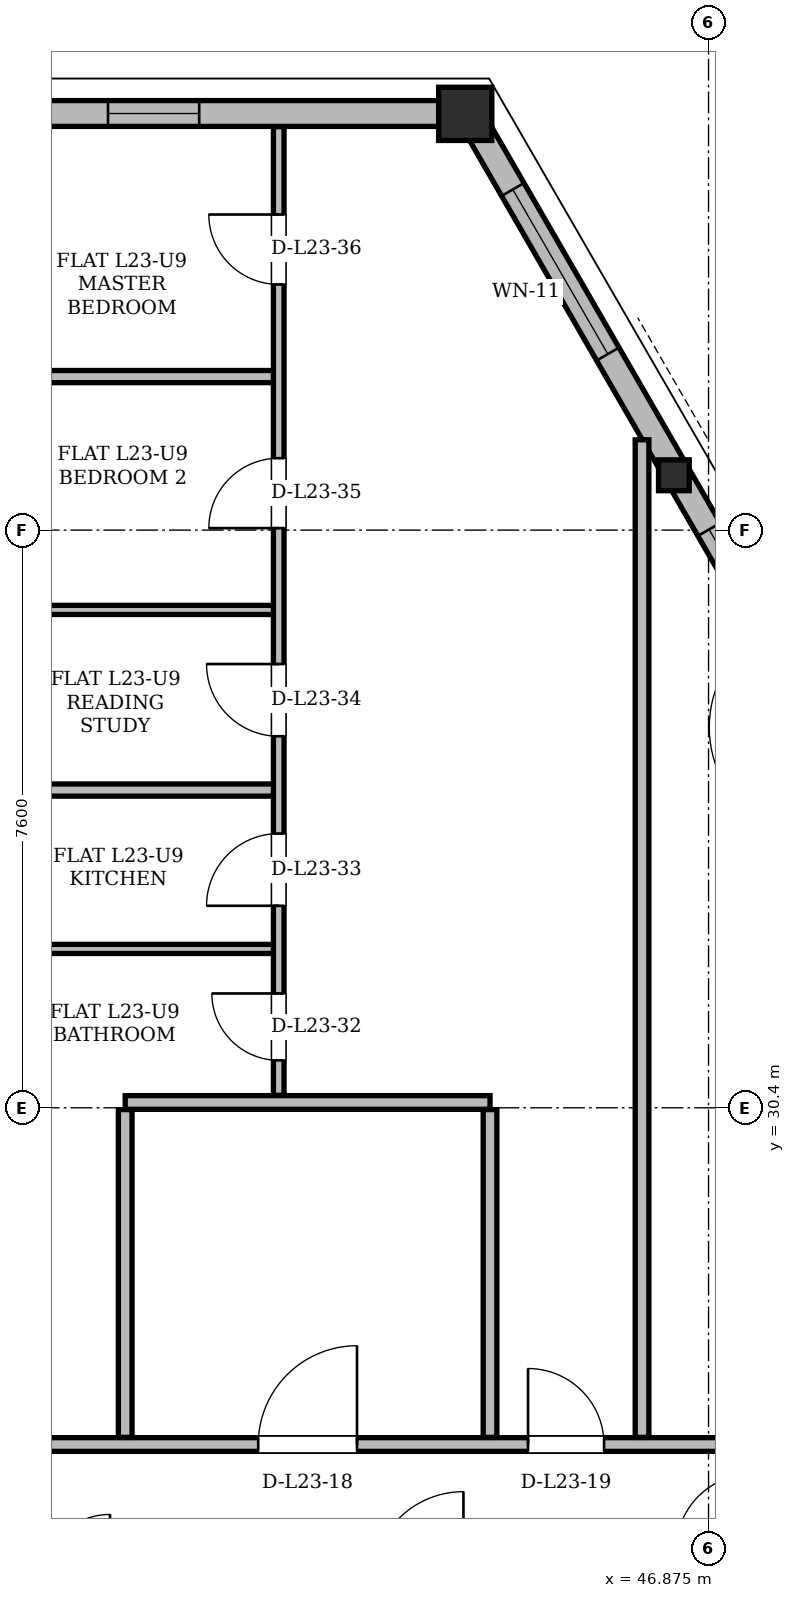
"""IFC4 building model, lengths in metres.
Left out: names, types, materials, properties, quantities, classifications, styles, units other than length and angle.
Written with IfcOpenShell. Run it as: python <this file> out.ifc"""

import sys

from ifc_helpers import new_model, si_unit, direction, frame, frame_2d, origin, origin_2d, place, context, subcontext, project, spatial, rectangle, hollow_rectangle, i_section, extrude, element, fill, save


model = new_model("IFC4")
c1 = context("Model", 3, precision=1e-05, world=origin(), true_north=direction((0.0, 1.0)))
c2 = subcontext(c1, "Body", "Model", "MODEL_VIEW")
j1 = project(units=[si_unit("LENGTHUNIT", "METRE"), si_unit("PLANEANGLEUNIT", "RADIAN")], contexts=[c1])
p1 = place(None, origin())
s1 = spatial("IfcSite", under=j1, at=p1, CompositionType="ELEMENT")
p2 = place(p1, origin())
s2 = spatial("IfcBuilding", under=s1, at=p2, CompositionType="ELEMENT")
p3 = place(p2, frame((0.0, 0.0, 89.7)))
s3 = spatial("IfcBuildingStorey", under=s2, at=p3, CompositionType="ELEMENT", Elevation=89.7)
p4 = place(p3, frame((43.722, 43.481, 0.005), z_axis=(-0.027185941193, -0.002582664413, 0.99962705768), x_axis=(0.094574192526, -0.995517816068, 0.0)))
e1 = element("IfcColumn", 1, at=p4, inside=s3, PredefinedType="COLUMN", context=c2, shape_type="SweptSolid", body=[
    extrude(hollow_rectangle(XDim=0.7, YDim=0.7, WallThickness=0.055, at=origin_2d()), origin(), (0.0, 0.0, 1.0), 3.592),
])
p5 = place(p3, frame((46.465, 38.732, 0.005), z_axis=(-0.025419707024, -0.005709239011, 0.999660563934), x_axis=(0.219139714241, -0.975693489597, 0.0)))
e2 = element("IfcColumn", 2, at=p5, inside=s3, PredefinedType="COLUMN", context=c2, shape_type="SweptSolid", body=[
    extrude(i_section(OverallWidth=0.404, OverallDepth=0.406, WebThickness=0.027, FlangeThickness=0.044, at=origin_2d()), origin(), (0.0, 0.0, 1.0), 3.592),
])
p6 = place(p3, frame((60.86, 13.798, 0.0), z_axis=(0.0, 0.0, 1.0), x_axis=(-0.500004029544, 0.866023077313, 0.0)))
e3 = element("IfcWall", 3, at=p6, inside=s3, PredefinedType="SOLIDWALL", context=c2, shape_type="SweptSolid", body=[
    extrude(rectangle(XDim=34.275, YDim=0.34, at=frame_2d((17.137, 0.0))), origin(), (0.0, 0.0, 1.0), 2.578),
])
p7 = place(p6, frame((6.579, 0.0, 0.0)))
e4 = element("IfcOpeningElement", 4, at=p7, cuts=e3, PredefinedType="OPENING", context=c2, shape_type="SweptSolid", body=[
    extrude(rectangle(XDim=1.5, YDim=2.2, at=frame_2d((0.75, 1.1))), frame((0.0, 0.17, 0.0), z_axis=(0.0, -1.0, 0.0), x_axis=(1.0, 0.0, 0.0)), (0.0, 0.0, 1.0), 0.34),
])
p8 = place(p6, frame((24.95, 0.0, 0.0)))
e5 = element("IfcOpeningElement", 5, at=p8, cuts=e3, PredefinedType="OPENING", context=c2, shape_type="SweptSolid", body=[
    extrude(rectangle(XDim=1.5, YDim=2.2, at=frame_2d((0.75, 1.1))), frame((0.0, 0.17, 0.0), z_axis=(0.0, -1.0, 0.0), x_axis=(1.0, 0.0, 0.0)), (0.0, 0.0, 1.0), 0.34),
])
p9 = place(p6, frame((1.607, 0.0, 0.85)))
e6 = element("IfcOpeningElement", 6, at=p9, cuts=e3, PredefinedType="OPENING", context=c2, shape_type="SweptSolid", body=[
    extrude(rectangle(XDim=1.2, YDim=1.48, at=frame_2d((0.6, 0.74))), frame((0.0, 0.17, 0.0), z_axis=(0.0, -1.0, 0.0), x_axis=(1.0, 0.0, 0.0)), (0.0, 0.0, 1.0), 0.34),
])
p10 = place(p6, frame((30.62, 0.0, 0.85)))
e7 = element("IfcOpeningElement", 7, at=p10, cuts=e3, PredefinedType="OPENING", context=c2, shape_type="SweptSolid", body=[
    extrude(rectangle(XDim=2.5, YDim=1.618, at=frame_2d((1.25, 0.809))), frame((0.0, 0.17, 0.0), z_axis=(0.0, -1.0, 0.0), x_axis=(1.0, 0.0, 0.0)), (0.0, 0.0, 1.0), 0.34),
])
p11 = place(p6, frame((20.128, 0.0, 0.85)))
e8 = element("IfcOpeningElement", 8, at=p11, cuts=e3, PredefinedType="OPENING", context=c2, shape_type="SweptSolid", body=[
    extrude(rectangle(XDim=2.4, YDim=1.618, at=frame_2d((1.2, 0.809))), frame((0.0, 0.17, 0.0), z_axis=(0.0, -1.0, 0.0), x_axis=(1.0, 0.0, 0.0)), (0.0, 0.0, 1.0), 0.34),
])
p12 = place(p6, frame((26.756, 0.0, 0.85)))
e9 = element("IfcOpeningElement", 9, at=p12, cuts=e3, PredefinedType="OPENING", context=c2, shape_type="SweptSolid", body=[
    extrude(rectangle(XDim=1.2, YDim=1.48, at=frame_2d((0.6, 0.74))), frame((0.0, 0.17, 0.0), z_axis=(0.0, -1.0, 0.0), x_axis=(1.0, 0.0, 0.0)), (0.0, 0.0, 1.0), 0.34),
])
p13 = place(p6, frame((15.335, 0.0, 0.85)))
e10 = element("IfcOpeningElement", 10, at=p13, cuts=e3, PredefinedType="OPENING", context=c2, shape_type="SweptSolid", body=[
    extrude(rectangle(XDim=1.2, YDim=1.48, at=frame_2d((0.6, 0.74))), frame((0.0, 0.17, 0.0), z_axis=(0.0, -1.0, 0.0), x_axis=(1.0, 0.0, 0.0)), (0.0, 0.0, 1.0), 0.34),
])
p14 = place(p6, frame((17.911, 0.0, 0.85)))
e11 = element("IfcOpeningElement", 11, at=p14, cuts=e3, PredefinedType="OPENING", context=c2, shape_type="SweptSolid", body=[
    extrude(rectangle(XDim=1.2, YDim=1.48, at=frame_2d((0.6, 0.74))), frame((0.0, 0.17, 0.0), z_axis=(0.0, -1.0, 0.0), x_axis=(1.0, 0.0, 0.0)), (0.0, 0.0, 1.0), 0.34),
])
p15 = place(p3, frame((43.722, 43.481, 0.0), z_axis=(0.0, 0.0, 1.0), x_axis=(-1.0, 0.0, 0.0)))
e12 = element("IfcWall", 12, at=p15, inside=s3, PredefinedType="SOLIDWALL", context=c2, shape_type="SweptSolid", body=[
    extrude(rectangle(XDim=12.445, YDim=0.34, at=frame_2d((6.222, 0.0))), origin(), (0.0, 0.0, 1.0), 2.578),
])
p16 = place(p15, frame((3.549, 0.0, 0.85)))
e13 = element("IfcOpeningElement", 13, at=p16, cuts=e12, PredefinedType="OPENING", context=c2, shape_type="SweptSolid", body=[
    extrude(rectangle(XDim=1.2, YDim=1.48, at=frame_2d((0.6, 0.74))), frame((0.0, 0.17, 0.0), z_axis=(0.0, -1.0, 0.0), x_axis=(1.0, 0.0, 0.0)), (0.0, 0.0, 1.0), 0.34),
])
p17 = place(p3, frame((27.55, 25.97, 0.0), z_axis=(0.0, 0.0, 1.0), x_axis=(1.0, 0.0, 0.0)))
e14 = element("IfcWall", 14, at=p17, inside=s3, PredefinedType="PARTITIONING", context=c2, shape_type="SweptSolid", body=[
    extrude(rectangle(XDim=19.9, YDim=0.18, at=frame_2d((9.95, 0.0))), origin(), (0.0, 0.0, 1.0), 2.814),
])
p18 = place(p17, frame((0.425, 0.0, 0.0)))
e15 = element("IfcOpeningElement", 15, at=p18, cuts=e14, PredefinedType="OPENING", context=c2, shape_type="SweptSolid", body=[
    extrude(rectangle(XDim=1.0, YDim=2.18, at=frame_2d((0.5, 1.09))), frame((0.0, 0.09, 0.0), z_axis=(0.0, -1.0, 0.0), x_axis=(1.0, 0.0, 0.0)), (0.0, 0.0, 1.0), 0.18),
])
p19 = place(p17, frame((4.222, 0.0, 0.0)))
e16 = element("IfcOpeningElement", 16, at=p19, cuts=e14, PredefinedType="OPENING", context=c2, shape_type="SweptSolid", body=[
    extrude(rectangle(XDim=1.0, YDim=2.18, at=frame_2d((0.5, 1.09))), frame((0.0, 0.09, 0.0), z_axis=(0.0, -1.0, 0.0), x_axis=(1.0, 0.0, 0.0)), (0.0, 0.0, 1.0), 0.18),
])
p20 = place(p17, frame((13.4, 0.0, 0.0)))
e17 = element("IfcOpeningElement", 17, at=p20, cuts=e14, PredefinedType="OPENING", context=c2, shape_type="SweptSolid", body=[
    extrude(rectangle(XDim=1.3, YDim=2.2, at=frame_2d((0.65, 1.1))), frame((0.0, 0.09, 0.0), z_axis=(0.0, -1.0, 0.0), x_axis=(1.0, 0.0, 0.0)), (0.0, 0.0, 1.0), 0.18),
])
p21 = place(p17, frame((16.95, 0.0, 0.0)))
e18 = element("IfcOpeningElement", 18, at=p21, cuts=e14, PredefinedType="OPENING", context=c2, shape_type="SweptSolid", body=[
    extrude(rectangle(XDim=1.0, YDim=2.18, at=frame_2d((0.5, 1.09))), frame((0.0, 0.09, 0.0), z_axis=(0.0, -1.0, 0.0), x_axis=(1.0, 0.0, 0.0)), (0.0, 0.0, 1.0), 0.18),
])
p22 = place(p3, frame((39.2, 30.47, 0.0), z_axis=(0.0, 0.0, 1.0), x_axis=(1.0, 0.0, 0.0)))
e19 = element("IfcWall", 19, at=p22, inside=s3, PredefinedType="PARTITIONING", context=c2, shape_type="SweptSolid", body=[
    extrude(rectangle(XDim=4.8, YDim=0.18, at=frame_2d((2.4, 0.0))), origin(), (0.0, 0.0, 1.0), 3.36),
])
p23 = place(p3, frame((37.95, 32.49, 0.0), z_axis=(0.0, 0.0, 1.0), x_axis=(1.0, 0.0, 0.0)))
e20 = element("IfcWall", 20, at=p23, inside=s3, PredefinedType="PARTITIONING", context=c2, shape_type="SweptSolid", body=[
    extrude(rectangle(XDim=3.27, YDim=0.12, at=frame_2d((1.635, 0.0))), origin(), (0.0, 0.0, 1.0), 3.36),
])
p24 = place(p3, frame((37.95, 34.58, 0.0), z_axis=(0.0, 0.0, 1.0), x_axis=(1.0, 0.0, 0.0)))
e21 = element("IfcWall", 21, at=p24, inside=s3, PredefinedType="PARTITIONING", context=c2, shape_type="SweptSolid", body=[
    extrude(rectangle(XDim=3.27, YDim=0.16, at=frame_2d((1.635, 0.0))), origin(), (0.0, 0.0, 1.0), 3.36),
])
p25 = place(p3, frame((37.95, 36.95, 0.0), z_axis=(0.0, 0.0, 1.0), x_axis=(1.0, 0.0, 0.0)))
e22 = element("IfcWall", 22, at=p25, inside=s3, PredefinedType="PARTITIONING", context=c2, shape_type="SweptSolid", body=[
    extrude(rectangle(XDim=3.27, YDim=0.12, at=frame_2d((1.635, 0.0))), origin(), (0.0, 0.0, 1.0), 3.36),
])
p26 = place(p3, frame((37.95, 40.02, 0.0), z_axis=(0.0, 0.0, 1.0), x_axis=(1.0, 0.0, 0.0)))
e23 = element("IfcWall", 23, at=p26, inside=s3, PredefinedType="PARTITIONING", context=c2, shape_type="SweptSolid", body=[
    extrude(rectangle(XDim=3.27, YDim=0.16, at=frame_2d((1.635, 0.0))), origin(), (0.0, 0.0, 1.0), 3.36),
])
p27 = place(p3, frame((39.2, 26.064, 0.0), z_axis=(0.0, 0.0, 1.0), x_axis=(0.0, 1.0, 0.0)))
e24 = element("IfcWall", 24, at=p27, inside=s3, PredefinedType="PARTITIONING", context=c2, shape_type="SweptSolid", body=[
    extrude(rectangle(XDim=4.312, YDim=0.18, at=frame_2d((2.156, 0.0))), origin(), (0.0, 0.0, 1.0), 3.36),
])
p28 = place(p3, frame((41.22, 30.564, 0.0), z_axis=(0.0, 0.0, 1.0), x_axis=(0.0, 1.0, 0.0)))
e25 = element("IfcWall", 25, at=p28, inside=s3, PredefinedType="PARTITIONING", context=c2, shape_type="SweptSolid", body=[
    extrude(rectangle(XDim=12.743, YDim=0.14, at=frame_2d((6.372, 0.0))), origin(), (0.0, 0.0, 1.0), 3.36),
])
p29 = place(p28, frame((0.46, 0.0, 0.0)))
e26 = element("IfcOpeningElement", 26, at=p29, cuts=e25, PredefinedType="OPENING", context=c2, shape_type="SweptSolid", body=[
    extrude(rectangle(XDim=0.88, YDim=2.08, at=frame_2d((0.44, 1.04))), frame((0.0, 0.07, 0.0), z_axis=(0.0, -1.0, 0.0), x_axis=(1.0, 0.0, 0.0)), (0.0, 0.0, 1.0), 0.14),
])
p30 = place(p28, frame((2.494, 0.0, 0.0)))
e27 = element("IfcOpeningElement", 27, at=p30, cuts=e25, PredefinedType="OPENING", context=c2, shape_type="SweptSolid", body=[
    extrude(rectangle(XDim=0.95, YDim=2.1, at=frame_2d((0.475, 1.05))), frame((0.0, 0.07, 0.0), z_axis=(0.0, -1.0, 0.0), x_axis=(1.0, 0.0, 0.0)), (0.0, 0.0, 1.0), 0.14),
])
p31 = place(p28, frame((4.724, 0.0, 0.0)))
e28 = element("IfcOpeningElement", 28, at=p31, cuts=e25, PredefinedType="OPENING", context=c2, shape_type="SweptSolid", body=[
    extrude(rectangle(XDim=0.95, YDim=2.1, at=frame_2d((0.475, 1.05))), frame((0.0, 0.07, 0.0), z_axis=(0.0, -1.0, 0.0), x_axis=(1.0, 0.0, 0.0)), (0.0, 0.0, 1.0), 0.14),
])
p32 = place(p28, frame((7.462, 0.0, 0.0)))
e29 = element("IfcOpeningElement", 29, at=p32, cuts=e25, PredefinedType="OPENING", context=c2, shape_type="SweptSolid", body=[
    extrude(rectangle(XDim=0.92, YDim=2.12, at=frame_2d((0.46, 1.06))), frame((0.0, 0.07, 0.0), z_axis=(0.0, -1.0, 0.0), x_axis=(1.0, 0.0, 0.0)), (0.0, 0.0, 1.0), 0.14),
])
p33 = place(p28, frame((10.668, 0.0, 0.0)))
e30 = element("IfcOpeningElement", 30, at=p33, cuts=e25, PredefinedType="OPENING", context=c2, shape_type="SweptSolid", body=[
    extrude(rectangle(XDim=0.92, YDim=2.12, at=frame_2d((0.46, 1.06))), frame((0.0, 0.07, 0.0), z_axis=(0.0, -1.0, 0.0), x_axis=(1.0, 0.0, 0.0)), (0.0, 0.0, 1.0), 0.14),
])
p34 = place(p3, frame((44.0, 26.064, 0.0), z_axis=(0.0, 0.0, 1.0), x_axis=(0.0, 1.0, 0.0)))
e31 = element("IfcWall", 31, at=p34, inside=s3, PredefinedType="PARTITIONING", context=c2, shape_type="SweptSolid", body=[
    extrude(rectangle(XDim=4.312, YDim=0.18, at=frame_2d((2.156, 0.0))), origin(), (0.0, 0.0, 1.0), 2.946),
])
p35 = place(p3, frame((46.0, 26.064, 0.0), z_axis=(0.0, 0.0, 1.0), x_axis=(0.0, 1.0, 0.0)))
e32 = element("IfcWall", 32, at=p35, inside=s3, PredefinedType="PARTITIONING", context=c2, shape_type="SweptSolid", body=[
    extrude(rectangle(XDim=13.124, YDim=0.18, at=frame_2d((6.562, 0.0))), origin(), (0.0, 0.0, 1.0), 2.578),
])
p36 = place(p10, origin())
e33 = element("IfcWindow", 33, at=p36, inside=s3, PartitioningType="SINGLE_PANEL", PredefinedType="WINDOW", context=c2, shape_type="SweptSolid", body=[
    extrude(rectangle(XDim=2.5, YDim=1.618, at=frame_2d((1.25, 0.809))), frame((0.0, 0.03, 0.0), z_axis=(0.0, -1.0, 0.0), x_axis=(1.0, 0.0, 0.0)), (0.0, 0.0, 1.0), 0.06),
])
fill(e7, e33)
p37 = place(p12, origin())
e34 = element("IfcWindow", 34, at=p37, inside=s3, PartitioningType="SINGLE_PANEL", PredefinedType="WINDOW", context=c2, shape_type="SweptSolid", body=[
    extrude(rectangle(XDim=1.2, YDim=1.48, at=frame_2d((0.6, 0.74))), frame((0.0, 0.03, 0.0), z_axis=(0.0, -1.0, 0.0), x_axis=(1.0, 0.0, 0.0)), (0.0, 0.0, 1.0), 0.06),
])
fill(e9, e34)
p38 = place(p16, origin())
e35 = element("IfcWindow", 35, at=p38, inside=s3, PartitioningType="SINGLE_PANEL", PredefinedType="WINDOW", context=c2, shape_type="SweptSolid", body=[
    extrude(rectangle(XDim=1.2, YDim=1.48, at=frame_2d((0.6, 0.74))), frame((0.0, 0.03, 0.0), z_axis=(0.0, -1.0, 0.0), x_axis=(1.0, 0.0, 0.0)), (0.0, 0.0, 1.0), 0.06),
])
fill(e13, e35)
p39 = place(p20, origin())
e36 = element("IfcDoor", 36, at=p39, inside=s3, OperationType="SINGLE_SWING_RIGHT", PredefinedType="DOOR", context=c2, shape_type="SweptSolid", body=[
    extrude(rectangle(XDim=1.3, YDim=2.2, at=frame_2d((0.65, 1.1))), frame((0.0, 0.025, 0.0), z_axis=(0.0, -1.0, 0.0), x_axis=(1.0, 0.0, 0.0)), (0.0, 0.0, 1.0), 0.05),
])
fill(e17, e36)
p40 = place(p21, origin())
e37 = element("IfcDoor", 37, at=p40, inside=s3, OperationType="SINGLE_SWING_LEFT", PredefinedType="DOOR", context=c2, shape_type="SweptSolid", body=[
    extrude(rectangle(XDim=1.0, YDim=2.18, at=frame_2d((0.5, 1.09))), frame((0.0, 0.025, 0.0), z_axis=(0.0, -1.0, 0.0), x_axis=(1.0, 0.0, 0.0)), (0.0, 0.0, 1.0), 0.05),
])
fill(e18, e37)
p41 = place(p29, origin())
e38 = element("IfcDoor", 38, at=p41, inside=s3, OperationType="SINGLE_SWING_RIGHT", PredefinedType="DOOR", context=c2, shape_type="SweptSolid", body=[
    extrude(rectangle(XDim=0.88, YDim=2.08, at=frame_2d((0.44, 1.04))), frame((0.0, 0.025, 0.0), z_axis=(0.0, -1.0, 0.0), x_axis=(1.0, 0.0, 0.0)), (0.0, 0.0, 1.0), 0.05),
])
fill(e26, e38)
p42 = place(p30, origin())
e39 = element("IfcDoor", 39, at=p42, inside=s3, OperationType="SINGLE_SWING_LEFT", PredefinedType="DOOR", context=c2, shape_type="SweptSolid", body=[
    extrude(rectangle(XDim=0.95, YDim=2.1, at=frame_2d((0.475, 1.05))), frame((0.0, 0.025, 0.0), z_axis=(0.0, -1.0, 0.0), x_axis=(1.0, 0.0, 0.0)), (0.0, 0.0, 1.0), 0.05),
])
fill(e27, e39)
p43 = place(p31, origin())
e40 = element("IfcDoor", 40, at=p43, inside=s3, OperationType="SINGLE_SWING_RIGHT", PredefinedType="DOOR", context=c2, shape_type="SweptSolid", body=[
    extrude(rectangle(XDim=0.95, YDim=2.1, at=frame_2d((0.475, 1.05))), frame((0.0, 0.025, 0.0), z_axis=(0.0, -1.0, 0.0), x_axis=(1.0, 0.0, 0.0)), (0.0, 0.0, 1.0), 0.05),
])
fill(e28, e40)
p44 = place(p32, origin())
e41 = element("IfcDoor", 41, at=p44, inside=s3, OperationType="SINGLE_SWING_LEFT", PredefinedType="DOOR", context=c2, shape_type="SweptSolid", body=[
    extrude(rectangle(XDim=0.92, YDim=2.12, at=frame_2d((0.46, 1.06))), frame((0.0, 0.025, 0.0), z_axis=(0.0, -1.0, 0.0), x_axis=(1.0, 0.0, 0.0)), (0.0, 0.0, 1.0), 0.05),
])
fill(e29, e41)
p45 = place(p33, origin())
e42 = element("IfcDoor", 42, at=p45, inside=s3, OperationType="SINGLE_SWING_RIGHT", PredefinedType="DOOR", context=c2, shape_type="SweptSolid", body=[
    extrude(rectangle(XDim=0.92, YDim=2.12, at=frame_2d((0.46, 1.06))), frame((0.0, 0.025, 0.0), z_axis=(0.0, -1.0, 0.0), x_axis=(1.0, 0.0, 0.0)), (0.0, 0.0, 1.0), 0.05),
])
fill(e30, e42)
save(model, sys.argv[1])
